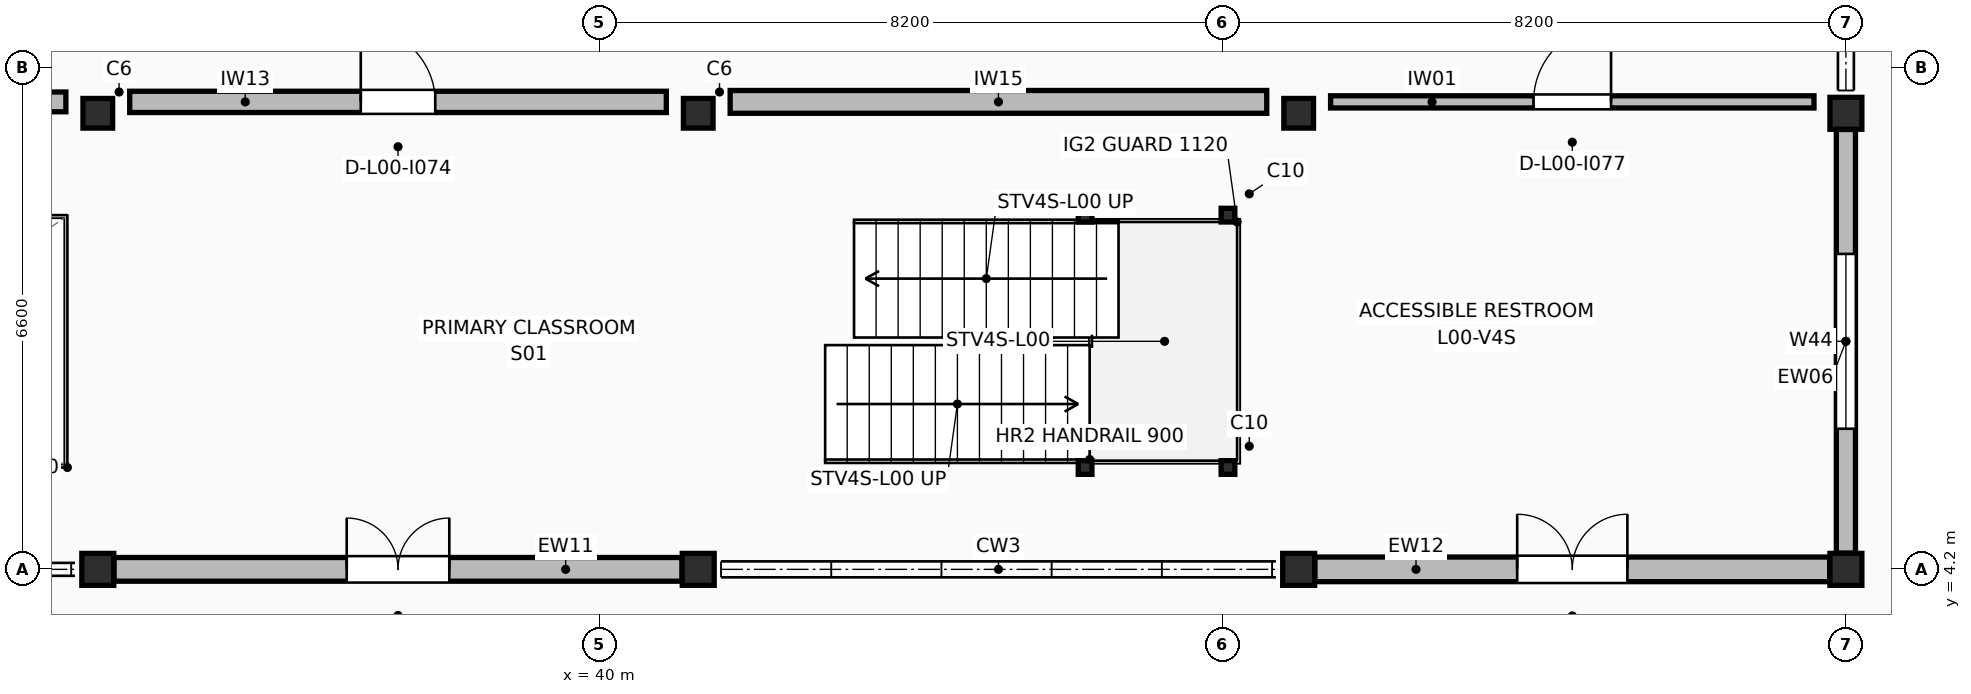
"""IFC4 building model, lengths in metres.
Left out: names, types, materials, properties, quantities, classifications, styles, units other than length and angle.
Written with IfcOpenShell. Run it as: python <this file> out.ifc"""

import sys

from ifc_helpers import new_model, si_unit, direction, frame, frame_2d, origin, origin_2d, place, context, subcontext, project, spatial, rectangle, hollow_rectangle, extrude, element, fill, save


model = new_model("IFC4")
c1 = context("Model", 3, precision=1e-05, world=origin(), true_north=direction((0.0, 1.0)))
c2 = subcontext(c1, "Body", "Model", "MODEL_VIEW")
j1 = project(units=[si_unit("LENGTHUNIT", "METRE"), si_unit("PLANEANGLEUNIT", "RADIAN")], contexts=[c1])
p1 = place(None, origin())
s1 = spatial("IfcSite", under=j1, at=p1, CompositionType="ELEMENT")
p2 = place(p1, origin())
s2 = spatial("IfcBuilding", under=s1, at=p2, CompositionType="ELEMENT")
p3 = place(p2, origin())
s3 = spatial("IfcBuildingStorey", under=s2, at=p3, CompositionType="ELEMENT", Elevation=0.0)
p4 = place(p3, frame((33.4, 4.2, 0.0), z_axis=(0.0, 0.0, 1.0), x_axis=(1.0, 0.0, 0.0)))
e1 = element("IfcColumn", 1, at=p4, inside=s3, PredefinedType="COLUMN", context=c2, shape_type="SweptSolid", body=[
    extrude(rectangle(XDim=0.42, YDim=0.42, at=origin_2d()), origin(), (0.0, 0.0, 1.0), 4.42),
])
p5 = place(p3, frame((33.4, 10.2, 0.0), z_axis=(0.0, 0.0, 1.0), x_axis=(1.0, 0.0, 0.0)))
e2 = element("IfcColumn", 2, at=p5, inside=s3, PredefinedType="COLUMN", context=c2, shape_type="SweptSolid", body=[
    extrude(rectangle(XDim=0.39, YDim=0.39, at=origin_2d()), origin(), (0.0, 0.0, 1.0), 4.42),
])
p6 = place(p3, frame((41.3, 4.2, 0.0), z_axis=(0.0, 0.0, 1.0), x_axis=(1.0, 0.0, 0.0)))
e3 = element("IfcColumn", 3, at=p6, inside=s3, PredefinedType="COLUMN", context=c2, shape_type="SweptSolid", body=[
    extrude(rectangle(XDim=0.42, YDim=0.42, at=origin_2d()), origin(), (0.0, 0.0, 1.0), 4.42),
])
p7 = place(p3, frame((41.3, 10.2, 0.0), z_axis=(0.0, 0.0, 1.0), x_axis=(1.0, 0.0, 0.0)))
e4 = element("IfcColumn", 4, at=p7, inside=s3, PredefinedType="COLUMN", context=c2, shape_type="SweptSolid", body=[
    extrude(rectangle(XDim=0.39, YDim=0.39, at=origin_2d()), origin(), (0.0, 0.0, 1.0), 4.42),
])
p8 = place(p3, frame((49.2, 4.2, 0.0), z_axis=(0.0, 0.0, 1.0), x_axis=(1.0, 0.0, 0.0)))
e5 = element("IfcColumn", 5, at=p8, inside=s3, PredefinedType="COLUMN", context=c2, shape_type="SweptSolid", body=[
    extrude(rectangle(XDim=0.42, YDim=0.42, at=origin_2d()), origin(), (0.0, 0.0, 1.0), 4.42),
])
p9 = place(p3, frame((49.2, 10.2, 0.0), z_axis=(0.0, 0.0, 1.0), x_axis=(1.0, 0.0, 0.0)))
e6 = element("IfcColumn", 6, at=p9, inside=s3, PredefinedType="COLUMN", context=c2, shape_type="SweptSolid", body=[
    extrude(rectangle(XDim=0.39, YDim=0.39, at=origin_2d()), origin(), (0.0, 0.0, 1.0), 4.42),
])
for number, where, z_axis, x_axis in (
    (7, (56.4, 4.2, 0.0), (0.0, 0.0, 1.0), (1.0, 0.0, 0.0)),
    (8, (56.4, 10.2, 0.0), (0.0, 0.0, 1.0), (1.0, 0.0, 0.0)),
):
    element("IfcColumn", number, at=place(p3, frame(where, z_axis=z_axis, x_axis=x_axis)), inside=s3, PredefinedType="COLUMN", context=c2, shape_type="SweptSolid", body=[
        extrude(rectangle(XDim=0.42, YDim=0.42, at=origin_2d()), origin(), (0.0, 0.0, 1.0), 4.42),
    ])
p10 = place(p3, frame((33.613, 4.2, 0.0), z_axis=(0.0, 0.0, 1.0), x_axis=(1.0, 0.0, 0.0)))
e9 = element("IfcWall", 9, at=p10, inside=s3, PredefinedType="STANDARD", context=c2, shape_type="SweptSolid", body=[
    extrude(rectangle(XDim=7.474, YDim=0.312, at=frame_2d((3.737, 0.0))), origin(), (0.0, 0.0, 1.0), 3.4),
])
p11 = place(p10, frame((3.062, 0.0, 0.0)))
e10 = element("IfcOpeningElement", 10, at=p11, cuts=e9, PredefinedType="OPENING", context=c2, shape_type="SweptSolid", body=[
    extrude(rectangle(XDim=1.35, YDim=2.2, at=frame_2d((0.675, 1.1))), frame((0.0, 0.166, 0.0), z_axis=(0.0, -1.0, 0.0), x_axis=(1.0, 0.0, 0.0)), (0.0, 0.0, 1.0), 0.332),
])
p12 = place(p3, frame((49.413, 4.2, 0.0), z_axis=(0.0, 0.0, 1.0), x_axis=(1.0, 0.0, 0.0)))
e11 = element("IfcWall", 11, at=p12, inside=s3, PredefinedType="STANDARD", context=c2, shape_type="SweptSolid", body=[
    extrude(rectangle(XDim=6.774, YDim=0.324, at=frame_2d((3.387, 0.0))), origin(), (0.0, 0.0, 1.0), 3.4),
])
p13 = place(p12, frame((2.662, 0.0, 0.0)))
e12 = element("IfcOpeningElement", 12, at=p13, cuts=e11, PredefinedType="OPENING", context=c2, shape_type="SweptSolid", body=[
    extrude(rectangle(XDim=1.45, YDim=2.22, at=frame_2d((0.725, 1.11))), frame((0.0, 0.172, 0.0), z_axis=(0.0, -1.0, 0.0), x_axis=(1.0, 0.0, 0.0)), (0.0, 0.0, 1.0), 0.344),
])
p14 = place(p3, frame((56.4, 4.413, 0.0), z_axis=(0.0, 0.0, 1.0), x_axis=(0.0, 1.0, 0.0)))
e13 = element("IfcWall", 13, at=p14, inside=s3, PredefinedType="STANDARD", context=c2, shape_type="SweptSolid", body=[
    extrude(rectangle(XDim=5.574, YDim=0.252, at=frame_2d((2.787, 0.0))), origin(), (0.0, 0.0, 1.0), 3.4),
])
p15 = place(p14, frame((1.637, 0.0, 0.95)))
e14 = element("IfcOpeningElement", 14, at=p15, cuts=e13, PredefinedType="OPENING", context=c2, shape_type="SweptSolid", body=[
    extrude(rectangle(XDim=2.3, YDim=1.6, at=frame_2d((1.15, 0.8))), frame((0.0, 0.136, 0.0), z_axis=(0.0, -1.0, 0.0), x_axis=(1.0, 0.0, 0.0)), (0.0, 0.0, 1.0), 0.272),
])
for number, where, z_axis, x_axis in (
    (15, (46.39, 5.54, 0.0), (0.0, 0.0, 1.0), (1.0, 0.0, 0.0)),
    (16, (46.39, 8.86, 0.0), (0.0, 0.0, 1.0), (1.0, 0.0, 0.0)),
    (17, (48.27, 5.54, 0.0), (0.0, 0.0, 1.0), (1.0, 0.0, 0.0)),
    (18, (48.27, 8.86, 0.0), (0.0, 0.0, 1.0), (1.0, 0.0, 0.0)),
):
    element("IfcColumn", number, at=place(p3, frame(where, z_axis=z_axis, x_axis=x_axis)), inside=s3, PredefinedType="COLUMN", context=c2, shape_type="SweptSolid", body=[
        extrude(hollow_rectangle(XDim=0.18, YDim=0.18, WallThickness=0.01, InnerFilletRadius=0.01, OuterFilletRadius=0.02, at=origin_2d()), origin(), (0.0, 0.0, 1.0), 4.42),
    ])
p16 = place(p3, frame((25.92, 10.35, 0.0), z_axis=(0.0, 0.0, 1.0), x_axis=(1.0, 0.0, 0.0)))
e19 = element("IfcWall", 19, at=p16, inside=s3, PredefinedType="STANDARD", context=c2, shape_type="SweptSolid", body=[
    extrude(rectangle(XDim=7.06, YDim=0.26, at=frame_2d((3.53, 0.0))), origin(), (0.0, 0.0, 1.0), 3.38),
])
p17 = place(p16, frame((3.04, 0.0, 0.0)))
e20 = element("IfcOpeningElement", 20, at=p17, cuts=e19, PredefinedType="OPENING", context=c2, shape_type="SweptSolid", body=[
    extrude(rectangle(XDim=0.98, YDim=2.06, at=frame_2d((0.49, 1.03))), frame((0.0, 0.14, 0.0), z_axis=(0.0, -1.0, 0.0), x_axis=(1.0, 0.0, 0.0)), (0.0, 0.0, 1.0), 0.28),
])
p18 = place(p3, frame((33.82, 10.35, 0.0), z_axis=(0.0, 0.0, 1.0), x_axis=(1.0, 0.0, 0.0)))
e21 = element("IfcWall", 21, at=p18, inside=s3, PredefinedType="STANDARD", context=c2, shape_type="SweptSolid", body=[
    extrude(rectangle(XDim=7.06, YDim=0.28, at=frame_2d((3.53, 0.0))), origin(), (0.0, 0.0, 1.0), 3.38),
])
p19 = place(p18, frame((3.04, 0.0, 0.0)))
e22 = element("IfcOpeningElement", 22, at=p19, cuts=e21, PredefinedType="OPENING", context=c2, shape_type="SweptSolid", body=[
    extrude(rectangle(XDim=0.98, YDim=2.18, at=frame_2d((0.49, 1.09))), frame((0.0, 0.15, 0.0), z_axis=(0.0, -1.0, 0.0), x_axis=(1.0, 0.0, 0.0)), (0.0, 0.0, 1.0), 0.3),
])
p20 = place(p3, frame((41.72, 10.35, 0.0), z_axis=(0.0, 0.0, 1.0), x_axis=(1.0, 0.0, 0.0)))
e23 = element("IfcWall", 23, at=p20, inside=s3, PredefinedType="STANDARD", context=c2, shape_type="SweptSolid", body=[
    extrude(rectangle(XDim=7.06, YDim=0.3, at=frame_2d((3.53, 0.0))), origin(), (0.0, 0.0, 1.0), 3.38),
])
p21 = place(p3, frame((49.62, 10.35, 0.0), z_axis=(0.0, 0.0, 1.0), x_axis=(1.0, 0.0, 0.0)))
e24 = element("IfcWall", 24, at=p21, inside=s3, PredefinedType="STANDARD", context=c2, shape_type="SweptSolid", body=[
    extrude(rectangle(XDim=6.36, YDim=0.16, at=frame_2d((3.18, 0.0))), origin(), (0.0, 0.0, 1.0), 3.38),
])
p22 = place(p21, frame((2.67, 0.0, 0.0)))
e25 = element("IfcOpeningElement", 25, at=p22, cuts=e24, PredefinedType="OPENING", context=c2, shape_type="SweptSolid", body=[
    extrude(rectangle(XDim=1.02, YDim=2.12, at=frame_2d((0.51, 1.06))), frame((0.0, 0.09, 0.0), z_axis=(0.0, -1.0, 0.0), x_axis=(1.0, 0.0, 0.0)), (0.0, 0.0, 1.0), 0.18),
])
p23 = place(p11, frame((1.35, 0.0, 0.0), z_axis=(0.0, 0.0, 1.0), x_axis=(-1.0, 0.0, 0.0)))
e26 = element("IfcDoor", 26, at=p23, inside=s3, OperationType="DOUBLE_DOOR_SINGLE_SWING", PredefinedType="DOOR", context=c2, shape_type="SweptSolid", body=[
    extrude(rectangle(XDim=1.35, YDim=2.2, at=frame_2d((0.675, 1.1))), frame((0.0, 0.025, 0.0), z_axis=(0.0, -1.0, 0.0), x_axis=(1.0, 0.0, 0.0)), (0.0, 0.0, 1.0), 0.05),
])
fill(e10, e26)
p24 = place(p13, frame((1.45, 0.0, 0.0), z_axis=(0.0, 0.0, 1.0), x_axis=(-1.0, 0.0, 0.0)))
e27 = element("IfcDoor", 27, at=p24, inside=s3, OperationType="DOUBLE_DOOR_SINGLE_SWING", PredefinedType="DOOR", context=c2, shape_type="SweptSolid", body=[
    extrude(rectangle(XDim=1.45, YDim=2.22, at=frame_2d((0.725, 1.11))), frame((0.0, 0.025, 0.0), z_axis=(0.0, -1.0, 0.0), x_axis=(1.0, 0.0, 0.0)), (0.0, 0.0, 1.0), 0.05),
])
fill(e12, e27)
p25 = place(p15, origin())
e28 = element("IfcWindow", 28, at=p25, inside=s3, PartitioningType="SINGLE_PANEL", PredefinedType="WINDOW", context=c2, shape_type="SweptSolid", body=[
    extrude(rectangle(XDim=2.3, YDim=1.6, at=frame_2d((1.15, 0.8))), frame((0.0, 0.03, 0.0), z_axis=(0.0, -1.0, 0.0), x_axis=(1.0, 0.0, 0.0)), (0.0, 0.0, 1.0), 0.06),
])
fill(e14, e28)
p26 = place(p19, origin())
e29 = element("IfcDoor", 29, at=p26, inside=s3, OperationType="SINGLE_SWING_LEFT", PredefinedType="DOOR", context=c2, shape_type="SweptSolid", body=[
    extrude(rectangle(XDim=0.98, YDim=2.18, at=frame_2d((0.49, 1.09))), frame((0.0, 0.025, 0.0), z_axis=(0.0, -1.0, 0.0), x_axis=(1.0, 0.0, 0.0)), (0.0, 0.0, 1.0), 0.05),
])
fill(e22, e29)
p27 = place(p22, origin())
e30 = element("IfcDoor", 30, at=p27, inside=s3, OperationType="SINGLE_SWING_RIGHT", PredefinedType="DOOR", context=c2, shape_type="SweptSolid", body=[
    extrude(rectangle(XDim=1.02, YDim=2.12, at=frame_2d((0.51, 1.06))), frame((0.0, 0.025, 0.0), z_axis=(0.0, -1.0, 0.0), x_axis=(1.0, 0.0, 0.0)), (0.0, 0.0, 1.0), 0.05),
])
fill(e25, e30)
save(model, sys.argv[1])
